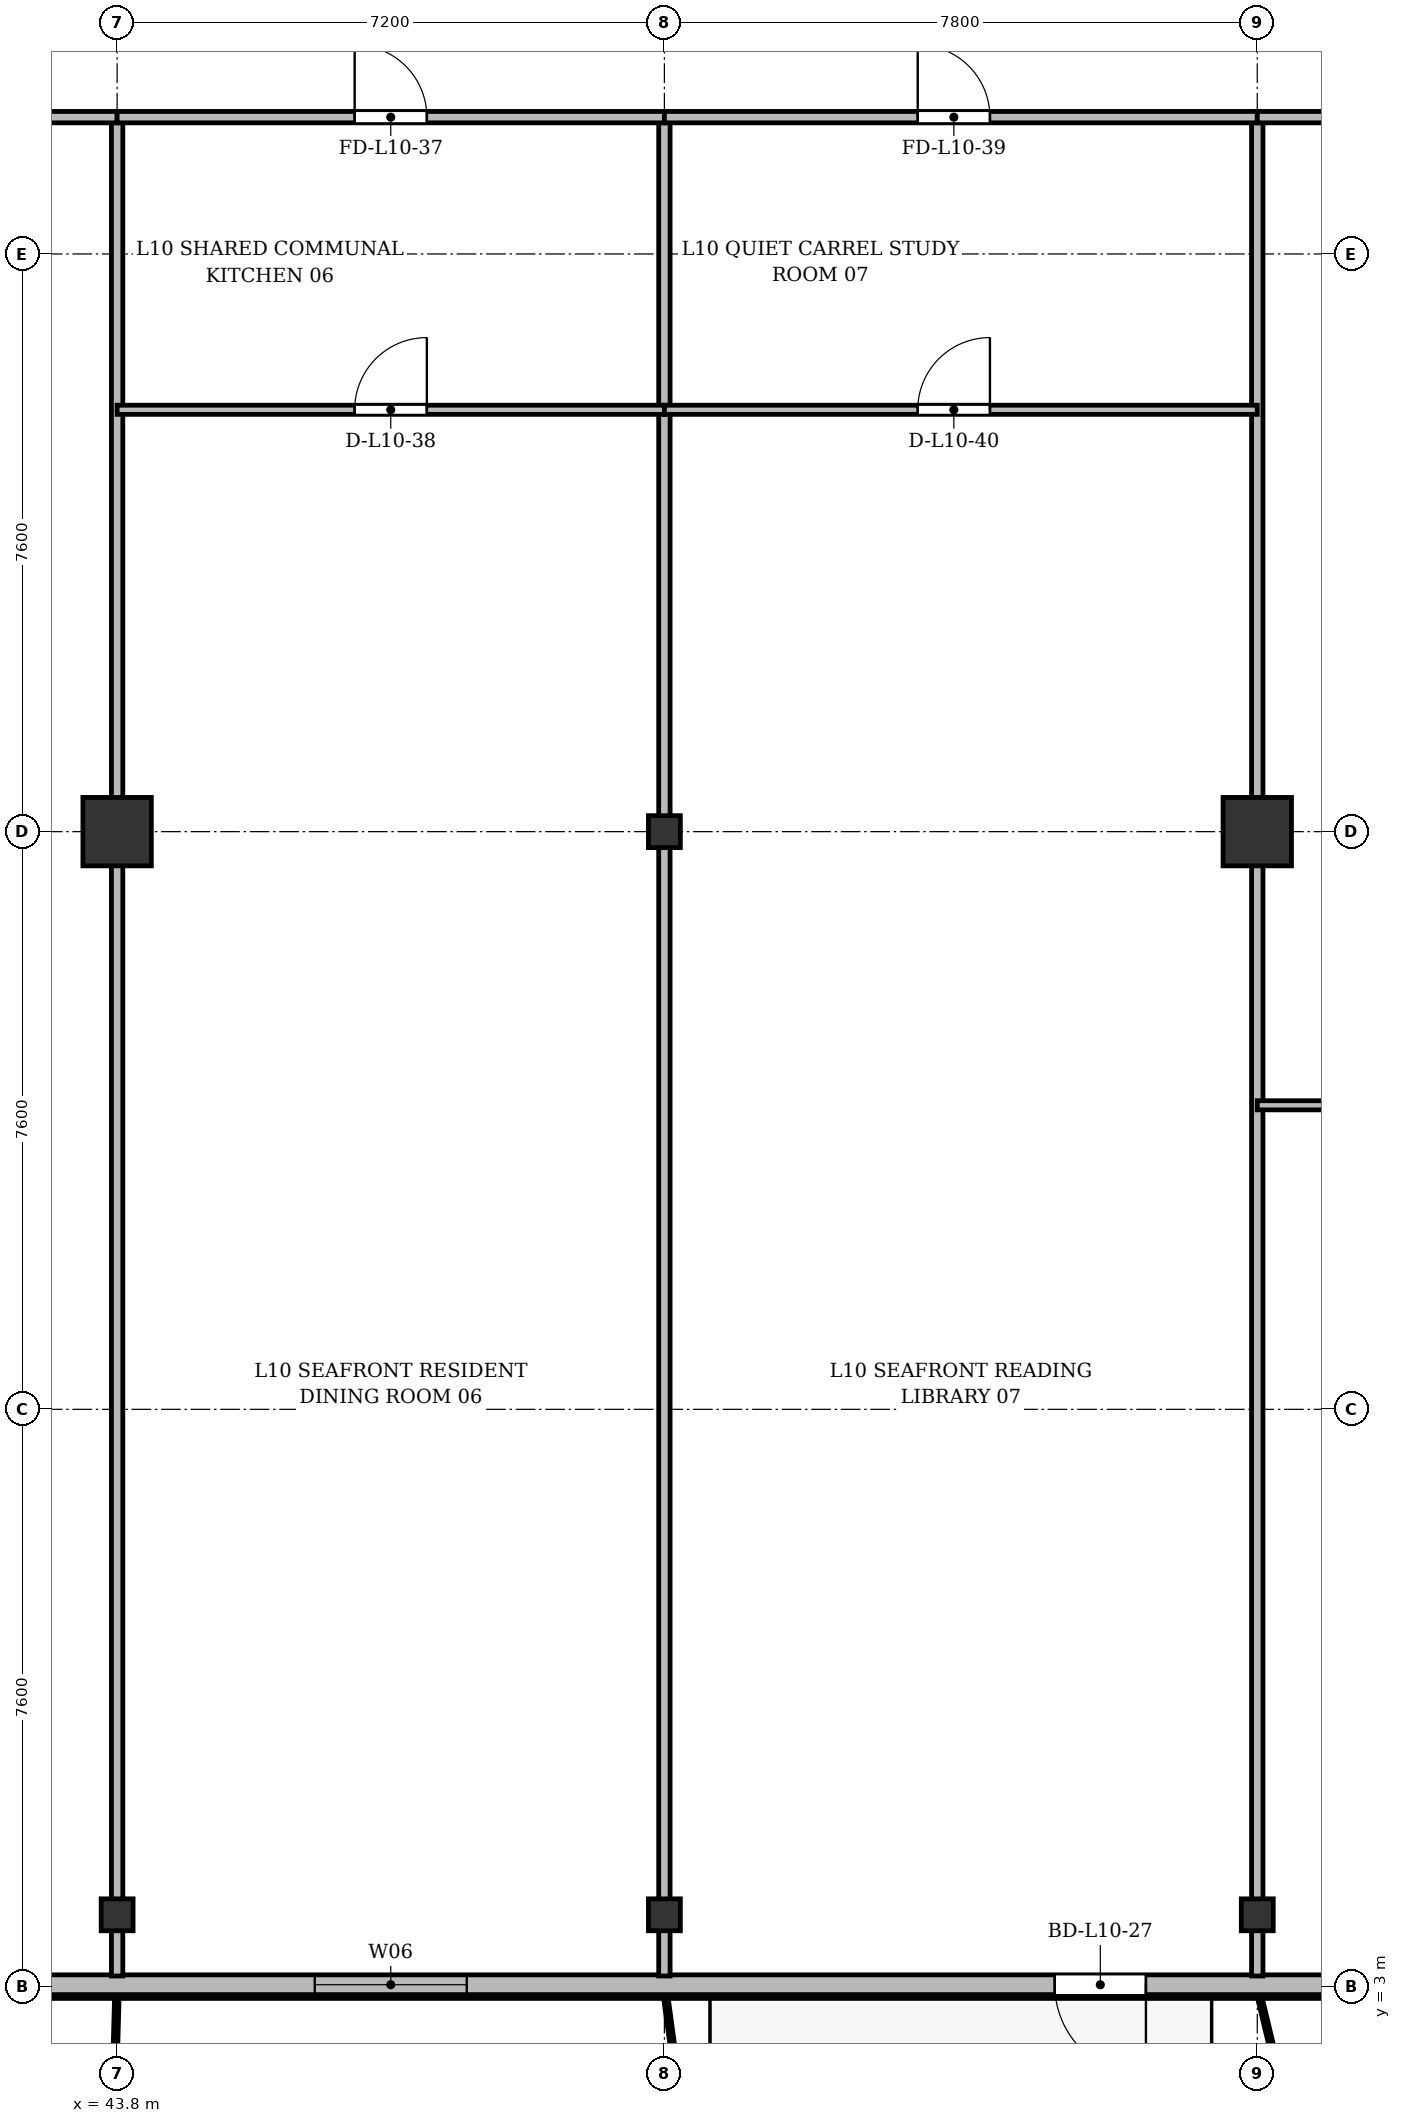
"""IFC4 building model, lengths in metres.
Left out: names, types, materials, properties, quantities, classifications, styles, units other than length and angle.
Written with IfcOpenShell. Run it as: python <this file> out.ifc"""

import sys

from ifc_helpers import new_model, si_unit, direction, frame, frame_2d, origin, origin_2d, place, context, subcontext, project, spatial, rectangle, i_section, extrude, source, transform, mapped, element, fill, save


model = new_model("IFC4")
c1 = context("Model", 3, precision=1e-05, world=origin(), true_north=direction((0.0, 1.0)))
c2 = subcontext(c1, "Body", "Model", "MODEL_VIEW")
j1 = project(units=[si_unit("LENGTHUNIT", "METRE"), si_unit("PLANEANGLEUNIT", "RADIAN")], contexts=[c1])
p1 = place(None, origin())
s1 = spatial("IfcSite", under=j1, at=p1, CompositionType="ELEMENT")
p2 = place(p1, origin())
s2 = spatial("IfcBuilding", under=s1, at=p2, CompositionType="ELEMENT")
p3 = place(p2, frame((0.0, 0.0, 41.5)))
s3 = spatial("IfcBuildingStorey", under=s2, at=p3, CompositionType="ELEMENT", Elevation=41.5)
m1 = source(origin(), c2, "Body", "SweptSolid", [
    extrude(i_section(OverallWidth=0.42, OverallDepth=0.42, WebThickness=0.026, FlangeThickness=0.04, at=origin_2d()), origin(), (0.0, 0.0, 1.0), 3.6),
])
p4 = place(p3, frame((43.8, 3.95, 0.0), z_axis=(0.0, 0.0, 1.0), x_axis=(1.0, 0.0, 0.0)))
e1 = element("IfcColumn", 1, at=p4, inside=s3, PredefinedType="COLUMN", context=c2, shape_type="MappedRepresentation", body=[
    mapped(m1, transform((0.0, 0.0, 0.0), x_axis=(1.0, 0.0, 0.0), y_axis=(0.0, 1.0, 0.0), z_axis=(0.0, 0.0, 1.0), scale=1.0)),
])
m2 = source(origin(), c2, "Body", "SweptSolid", [
    extrude(rectangle(XDim=0.9, YDim=0.9, at=origin_2d()), origin(), (0.0, 0.0, 1.0), 3.6),
])
p5 = place(p3, frame((43.8, 18.2, 0.0), z_axis=(0.0, 0.0, 1.0), x_axis=(1.0, 0.0, 0.0)))
e2 = element("IfcColumn", 2, at=p5, inside=s3, PredefinedType="COLUMN", context=c2, shape_type="MappedRepresentation", body=[
    mapped(m2, transform((0.0, 0.0, 0.0), x_axis=(1.0, 0.0, 0.0), y_axis=(0.0, 1.0, 0.0), z_axis=(0.0, 0.0, 1.0), scale=1.0)),
])
for number, where, z_axis, x_axis in (
    (3, (51.0, 3.95, 0.0), (0.0, 0.0, 1.0), (1.0, 0.0, 0.0)),
    (4, (51.0, 18.2, 0.0), (0.0, 0.0, 1.0), (1.0, 0.0, 0.0)),
    (5, (58.8, 3.95, 0.0), (0.0, 0.0, 1.0), (1.0, 0.0, 0.0)),
):
    element("IfcColumn", number, at=place(p3, frame(where, z_axis=z_axis, x_axis=x_axis)), inside=s3, PredefinedType="COLUMN", context=c2, shape_type="MappedRepresentation", body=[
        mapped(m1, transform((0.0, 0.0, 0.0), x_axis=(1.0, 0.0, 0.0), y_axis=(0.0, 1.0, 0.0), z_axis=(0.0, 0.0, 1.0), scale=1.0)),
    ])
p6 = place(p3, frame((58.8, 18.2, 0.0), z_axis=(0.0, 0.0, 1.0), x_axis=(1.0, 0.0, 0.0)))
e6 = element("IfcColumn", 6, at=p6, inside=s3, PredefinedType="COLUMN", context=c2, shape_type="MappedRepresentation", body=[
    mapped(m2, transform((0.0, 0.0, 0.0), x_axis=(1.0, 0.0, 0.0), y_axis=(0.0, 1.0, 0.0), z_axis=(0.0, 0.0, 1.0), scale=1.0)),
])
p7 = place(p3, frame((66.9, 3.03, 0.0), z_axis=(0.0, 0.0, 1.0), x_axis=(-1.0, 0.0, 0.0)))
e7 = element("IfcWall", 7, at=p7, inside=s3, PredefinedType="SOLIDWALL", context=c2, shape_type="SweptSolid", body=[
    extrude(rectangle(XDim=59.4, YDim=0.26, at=frame_2d((29.7, 0.0))), origin(), (0.0, 0.0, 1.0), 3.34),
])
p8 = place(p7, frame((3.6, 0.0, 0.9)))
e8 = element("IfcOpeningElement", 8, at=p8, cuts=e7, PredefinedType="OPENING", context=c2, shape_type="SweptSolid", body=[
    extrude(rectangle(XDim=2.2, YDim=1.8, at=frame_2d((1.1, 0.9))), frame((0.0, 0.14, 0.0), z_axis=(0.0, -1.0, 0.0), x_axis=(1.0, 0.0, 0.0)), (0.0, 0.0, 1.0), 0.28),
])
p9 = place(p7, frame((9.565, 0.0, 0.0)))
e9 = element("IfcOpeningElement", 9, at=p9, cuts=e7, PredefinedType="OPENING", context=c2, shape_type="SweptSolid", body=[
    extrude(rectangle(XDim=1.2, YDim=2.2, at=frame_2d((0.6, 1.1))), frame((0.0, 0.14, 0.0), z_axis=(0.0, -1.0, 0.0), x_axis=(1.0, 0.0, 0.0)), (0.0, 0.0, 1.0), 0.28),
])
p10 = place(p7, frame((18.5, 0.0, 0.9)))
e10 = element("IfcOpeningElement", 10, at=p10, cuts=e7, PredefinedType="OPENING", context=c2, shape_type="SweptSolid", body=[
    extrude(rectangle(XDim=2.0, YDim=1.95, at=frame_2d((1.0, 0.975))), frame((0.0, 0.14, 0.0), z_axis=(0.0, -1.0, 0.0), x_axis=(1.0, 0.0, 0.0)), (0.0, 0.0, 1.0), 0.28),
])
p11 = place(p7, frame((28.875, 0.0, 0.9)))
e11 = element("IfcOpeningElement", 11, at=p11, cuts=e7, PredefinedType="OPENING", context=c2, shape_type="SweptSolid", body=[
    extrude(rectangle(XDim=1.65, YDim=1.85, at=frame_2d((0.825, 0.925))), frame((0.0, 0.14, 0.0), z_axis=(0.0, -1.0, 0.0), x_axis=(1.0, 0.0, 0.0)), (0.0, 0.0, 1.0), 0.28),
])
p12 = place(p7, frame((40.301, 0.0, 0.0)))
e12 = element("IfcOpeningElement", 12, at=p12, cuts=e7, PredefinedType="OPENING", context=c2, shape_type="SweptSolid", body=[
    extrude(rectangle(XDim=1.2, YDim=2.2, at=frame_2d((0.6, 1.1))), frame((0.0, 0.14, 0.0), z_axis=(0.0, -1.0, 0.0), x_axis=(1.0, 0.0, 0.0)), (0.0, 0.0, 1.0), 0.28),
])
p13 = place(p7, frame((46.3, 0.0, 0.9)))
e13 = element("IfcOpeningElement", 13, at=p13, cuts=e7, PredefinedType="OPENING", context=c2, shape_type="SweptSolid", body=[
    extrude(rectangle(XDim=2.2, YDim=1.8, at=frame_2d((1.1, 0.9))), frame((0.0, 0.14, 0.0), z_axis=(0.0, -1.0, 0.0), x_axis=(1.0, 0.0, 0.0)), (0.0, 0.0, 1.0), 0.28),
])
p14 = place(p7, frame((55.817, 0.0, 0.0)))
e14 = element("IfcOpeningElement", 14, at=p14, cuts=e7, PredefinedType="OPENING", context=c2, shape_type="SweptSolid", body=[
    extrude(rectangle(XDim=1.2, YDim=2.2, at=frame_2d((0.6, 1.1))), frame((0.0, 0.14, 0.0), z_axis=(0.0, -1.0, 0.0), x_axis=(1.0, 0.0, 0.0)), (0.0, 0.0, 1.0), 0.28),
])
for number, where, z_axis, x_axis in (
    (15, (43.8, 3.145, 0.0), (0.0, 0.0, 1.0), (0.0, 1.0, 0.0)),
    (16, (51.0, 3.145, 0.0), (0.0, 0.0, 1.0), (0.0, 1.0, 0.0)),
    (17, (58.8, 3.145, 0.0), (0.0, 0.0, 1.0), (0.0, 1.0, 0.0)),
):
    element("IfcWall", number, at=place(p3, frame(where, z_axis=z_axis, x_axis=x_axis)), inside=s3, PredefinedType="PARTITIONING", context=c2, shape_type="SweptSolid", body=[
        extrude(rectangle(XDim=24.455, YDim=0.15, at=frame_2d((12.228, 0.0))), origin(), (0.0, 0.0, 1.0), 2.752),
    ])
p15 = place(p3, frame((30.6, 27.6, 0.0), z_axis=(0.0, 0.0, 1.0), x_axis=(1.0, 0.0, 0.0)))
e18 = element("IfcWall", 18, at=p15, inside=s3, PredefinedType="PARTITIONING", context=c2, shape_type="SweptSolid", body=[
    extrude(rectangle(XDim=13.2, YDim=0.15, at=frame_2d((6.6, 0.0))), origin(), (0.0, 0.0, 1.0), 2.752),
])
p16 = place(p15, frame((5.8, 0.0, 0.0)))
e19 = element("IfcOpeningElement", 19, at=p16, cuts=e18, PredefinedType="OPENING", context=c2, shape_type="SweptSolid", body=[
    extrude(rectangle(XDim=1.6, YDim=2.2, at=frame_2d((0.8, 1.1))), frame((0.0, 0.085, 0.0), z_axis=(0.0, -1.0, 0.0), x_axis=(1.0, 0.0, 0.0)), (0.0, 0.0, 1.0), 0.17),
])
p17 = place(p3, frame((43.8, 27.6, 0.0), z_axis=(0.0, 0.0, 1.0), x_axis=(1.0, 0.0, 0.0)))
e20 = element("IfcWall", 20, at=p17, inside=s3, PredefinedType="PARTITIONING", context=c2, shape_type="SweptSolid", body=[
    extrude(rectangle(XDim=7.2, YDim=0.15, at=frame_2d((3.6, 0.0))), origin(), (0.0, 0.0, 1.0), 2.752),
])
p18 = place(p17, frame((3.125, 0.0, 0.0)))
e21 = element("IfcOpeningElement", 21, at=p18, cuts=e20, PredefinedType="OPENING", context=c2, shape_type="SweptSolid", body=[
    extrude(rectangle(XDim=0.95, YDim=2.15, at=frame_2d((0.475, 1.075))), frame((0.0, 0.085, 0.0), z_axis=(0.0, -1.0, 0.0), x_axis=(1.0, 0.0, 0.0)), (0.0, 0.0, 1.0), 0.17),
])
p19 = place(p3, frame((43.8, 23.75, 0.0), z_axis=(0.0, 0.0, 1.0), x_axis=(1.0, 0.0, 0.0)))
e22 = element("IfcWall", 22, at=p19, inside=s3, PredefinedType="PARTITIONING", context=c2, shape_type="SweptSolid", body=[
    extrude(rectangle(XDim=7.2, YDim=0.12, at=frame_2d((3.6, 0.0))), origin(), (0.0, 0.0, 1.0), 2.752),
])
p20 = place(p19, frame((3.125, 0.0, 0.0)))
e23 = element("IfcOpeningElement", 23, at=p20, cuts=e22, PredefinedType="OPENING", context=c2, shape_type="SweptSolid", body=[
    extrude(rectangle(XDim=0.95, YDim=2.15, at=frame_2d((0.475, 1.075))), frame((0.0, 0.07, 0.0), z_axis=(0.0, -1.0, 0.0), x_axis=(1.0, 0.0, 0.0)), (0.0, 0.0, 1.0), 0.14),
])
p21 = place(p3, frame((51.0, 27.6, 0.0), z_axis=(0.0, 0.0, 1.0), x_axis=(1.0, 0.0, 0.0)))
e24 = element("IfcWall", 24, at=p21, inside=s3, PredefinedType="PARTITIONING", context=c2, shape_type="SweptSolid", body=[
    extrude(rectangle(XDim=7.8, YDim=0.15, at=frame_2d((3.9, 0.0))), origin(), (0.0, 0.0, 1.0), 2.752),
])
p22 = place(p21, frame((3.333, 0.0, 0.0)))
e25 = element("IfcOpeningElement", 25, at=p22, cuts=e24, PredefinedType="OPENING", context=c2, shape_type="SweptSolid", body=[
    extrude(rectangle(XDim=0.95, YDim=2.15, at=frame_2d((0.475, 1.075))), frame((0.0, 0.085, 0.0), z_axis=(0.0, -1.0, 0.0), x_axis=(1.0, 0.0, 0.0)), (0.0, 0.0, 1.0), 0.17),
])
p23 = place(p3, frame((51.0, 23.75, 0.0), z_axis=(0.0, 0.0, 1.0), x_axis=(1.0, 0.0, 0.0)))
e26 = element("IfcWall", 26, at=p23, inside=s3, PredefinedType="PARTITIONING", context=c2, shape_type="SweptSolid", body=[
    extrude(rectangle(XDim=7.8, YDim=0.12, at=frame_2d((3.9, 0.0))), origin(), (0.0, 0.0, 1.0), 2.752),
])
p24 = place(p23, frame((3.333, 0.0, 0.0)))
e27 = element("IfcOpeningElement", 27, at=p24, cuts=e26, PredefinedType="OPENING", context=c2, shape_type="SweptSolid", body=[
    extrude(rectangle(XDim=0.95, YDim=2.15, at=frame_2d((0.475, 1.075))), frame((0.0, 0.07, 0.0), z_axis=(0.0, -1.0, 0.0), x_axis=(1.0, 0.0, 0.0)), (0.0, 0.0, 1.0), 0.14),
])
p25 = place(p3, frame((58.8, 27.6, 0.0), z_axis=(0.0, 0.0, 1.0), x_axis=(1.0, 0.0, 0.0)))
e28 = element("IfcWall", 28, at=p25, inside=s3, PredefinedType="PARTITIONING", context=c2, shape_type="SweptSolid", body=[
    extrude(rectangle(XDim=6.8, YDim=0.15, at=frame_2d((3.4, 0.0))), origin(), (0.0, 0.0, 1.0), 2.752),
])
p26 = place(p25, frame((2.925, 0.0, 0.0)))
e29 = element("IfcOpeningElement", 29, at=p26, cuts=e28, PredefinedType="OPENING", context=c2, shape_type="SweptSolid", body=[
    extrude(rectangle(XDim=0.95, YDim=2.15, at=frame_2d((0.475, 1.075))), frame((0.0, 0.085, 0.0), z_axis=(0.0, -1.0, 0.0), x_axis=(1.0, 0.0, 0.0)), (0.0, 0.0, 1.0), 0.17),
])
p27 = place(p3, frame((58.8, 14.6, 0.0), z_axis=(0.0, 0.0, 1.0), x_axis=(1.0, 0.0, 0.0)))
e30 = element("IfcWall", 30, at=p27, inside=s3, PredefinedType="PARTITIONING", context=c2, shape_type="SweptSolid", body=[
    extrude(rectangle(XDim=6.8, YDim=0.12, at=frame_2d((3.4, 0.0))), origin(), (0.0, 0.0, 1.0), 2.752),
])
p28 = place(p27, frame((2.925, 0.0, 0.0)))
e31 = element("IfcOpeningElement", 31, at=p28, cuts=e30, PredefinedType="OPENING", context=c2, shape_type="SweptSolid", body=[
    extrude(rectangle(XDim=0.95, YDim=2.15, at=frame_2d((0.475, 1.075))), frame((0.0, 0.07, 0.0), z_axis=(0.0, -1.0, 0.0), x_axis=(1.0, 0.0, 0.0)), (0.0, 0.0, 1.0), 0.14),
])
m3 = source(origin(), c2, "Body", "SweptSolid", [
    extrude(rectangle(XDim=1.2, YDim=2.2, at=frame_2d((0.6, 1.1))), frame((0.0, 0.025, 0.0), z_axis=(0.0, -1.0, 0.0), x_axis=(1.0, 0.0, 0.0)), (0.0, 0.0, 1.0), 0.05),
])
p29 = place(p9, origin())
e32 = element("IfcDoor", 32, at=p29, inside=s3, OperationType="SINGLE_SWING_LEFT", PredefinedType="DOOR", context=c2, shape_type="MappedRepresentation", body=[
    mapped(m3, transform((0.0, 0.0, 0.0), x_axis=(1.0, 0.0, 0.0), y_axis=(0.0, 1.0, 0.0), z_axis=(0.0, 0.0, 1.0), scale=1.0)),
])
fill(e9, e32)
m4 = source(origin(), c2, "Body", "SweptSolid", [
    extrude(rectangle(XDim=2.0, YDim=1.95, at=frame_2d((1.0, 0.975))), frame((0.0, 0.03, 0.0), z_axis=(0.0, -1.0, 0.0), x_axis=(1.0, 0.0, 0.0)), (0.0, 0.0, 1.0), 0.06),
])
p30 = place(p10, origin())
e33 = element("IfcWindow", 33, at=p30, inside=s3, PartitioningType="SINGLE_PANEL", PredefinedType="WINDOW", context=c2, shape_type="MappedRepresentation", body=[
    mapped(m4, transform((0.0, 0.0, 0.0), x_axis=(1.0, 0.0, 0.0), y_axis=(0.0, 1.0, 0.0), z_axis=(0.0, 0.0, 1.0), scale=1.0)),
])
fill(e10, e33)
m5 = source(origin(), c2, "Body", "SweptSolid", [
    extrude(rectangle(XDim=0.95, YDim=2.15, at=frame_2d((0.475, 1.075))), frame((0.0, 0.025, 0.0), z_axis=(0.0, -1.0, 0.0), x_axis=(1.0, 0.0, 0.0)), (0.0, 0.0, 1.0), 0.05),
])
p31 = place(p18, origin())
e34 = element("IfcDoor", 34, at=p31, inside=s3, OperationType="SINGLE_SWING_LEFT", PredefinedType="DOOR", context=c2, shape_type="MappedRepresentation", body=[
    mapped(m5, transform((0.0, 0.0, 0.0), x_axis=(1.0, 0.0, 0.0), y_axis=(0.0, 1.0, 0.0), z_axis=(0.0, 0.0, 1.0), scale=1.0)),
])
fill(e21, e34)
p32 = place(p20, origin())
e35 = element("IfcDoor", 35, at=p32, inside=s3, OperationType="SINGLE_SWING_RIGHT", PredefinedType="DOOR", context=c2, shape_type="MappedRepresentation", body=[
    mapped(m5, transform((0.0, 0.0, 0.0), x_axis=(1.0, 0.0, 0.0), y_axis=(0.0, 1.0, 0.0), z_axis=(0.0, 0.0, 1.0), scale=1.0)),
])
fill(e23, e35)
p33 = place(p22, origin())
e36 = element("IfcDoor", 36, at=p33, inside=s3, OperationType="SINGLE_SWING_LEFT", PredefinedType="DOOR", context=c2, shape_type="MappedRepresentation", body=[
    mapped(m5, transform((0.0, 0.0, 0.0), x_axis=(1.0, 0.0, 0.0), y_axis=(0.0, 1.0, 0.0), z_axis=(0.0, 0.0, 1.0), scale=1.0)),
])
fill(e25, e36)
p34 = place(p24, origin())
e37 = element("IfcDoor", 37, at=p34, inside=s3, OperationType="SINGLE_SWING_RIGHT", PredefinedType="DOOR", context=c2, shape_type="MappedRepresentation", body=[
    mapped(m5, transform((0.0, 0.0, 0.0), x_axis=(1.0, 0.0, 0.0), y_axis=(0.0, 1.0, 0.0), z_axis=(0.0, 0.0, 1.0), scale=1.0)),
])
fill(e27, e37)
save(model, sys.argv[1])
